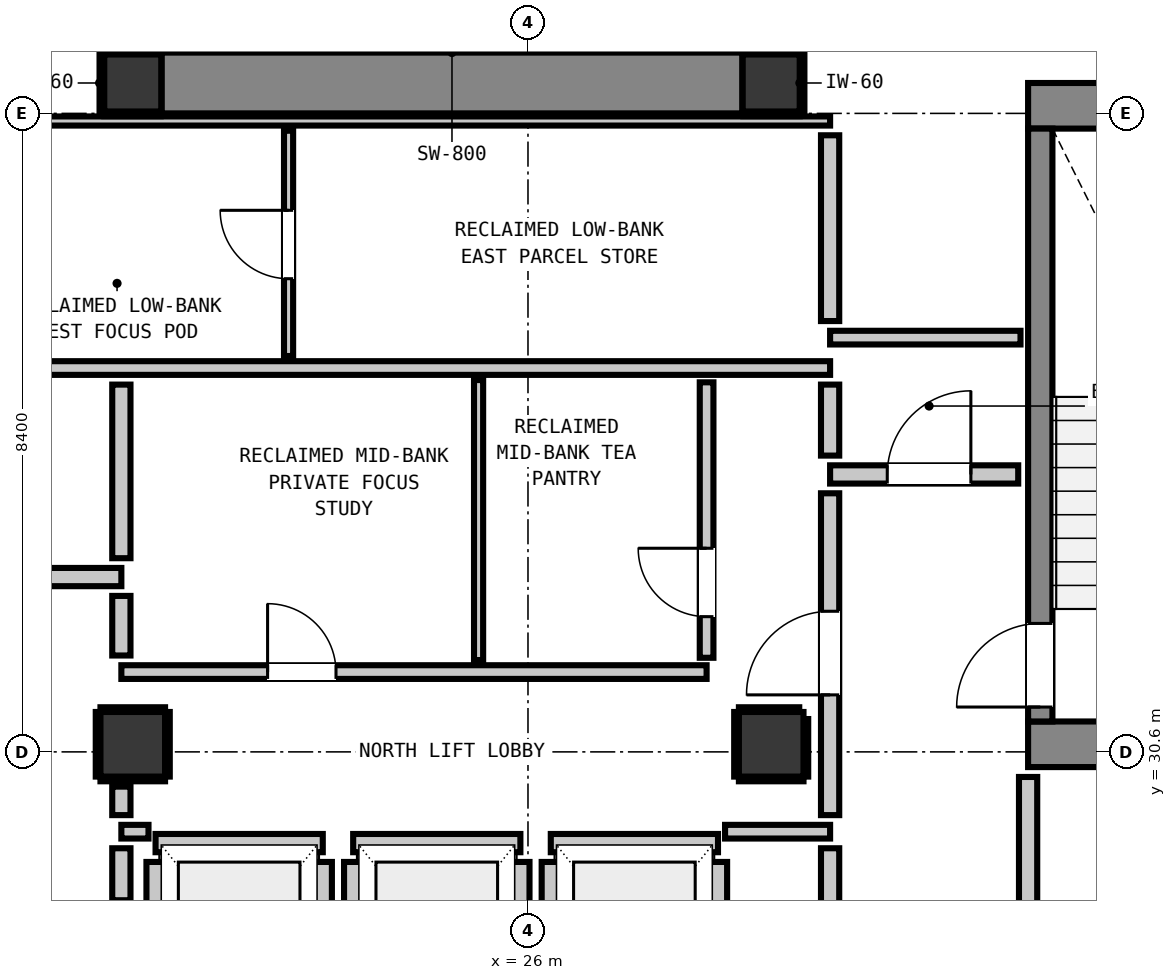
"""IFC4 building model, lengths in metres.
Left out: names, types, materials, properties, quantities, classifications, styles, units other than length and angle.
Written with IfcOpenShell. Run it as: python <this file> out.ifc"""

import sys

from ifc_helpers import new_model, si_unit, direction, frame, frame_2d, origin, origin_2d, place, context, subcontext, project, spatial, rectangle, extrude, element, fill, save


model = new_model("IFC4")
c1 = context("Model", 3, precision=1e-05, world=origin(), true_north=direction((0.0, 1.0)))
c2 = subcontext(c1, "Body", "Model", "MODEL_VIEW")
j1 = project(units=[si_unit("LENGTHUNIT", "METRE"), si_unit("PLANEANGLEUNIT", "RADIAN")], contexts=[c1])
p1 = place(None, origin())
s1 = spatial("IfcSite", under=j1, at=p1, CompositionType="ELEMENT")
p2 = place(p1, origin())
s2 = spatial("IfcBuilding", under=s1, at=p2, CompositionType="ELEMENT")
p3 = place(p2, frame((0.0, 0.0, 220.04)))
s3 = spatial("IfcBuildingStorey", under=s2, at=p3, CompositionType="ELEMENT", Elevation=220.04)
for number, where, z_axis, x_axis in (
    (1, (20.8, 39.4, 0.0), (0.0, 0.0, 1.0), (1.0, 0.0, 0.0)),
    (2, (29.2, 39.4, 0.0), (0.0, 0.0, 1.0), (1.0, 0.0, 0.0)),
):
    element("IfcColumn", number, at=place(p3, frame(where, z_axis=z_axis, x_axis=x_axis)), inside=s3, PredefinedType="COLUMN", context=c2, shape_type="SweptSolid", body=[
        extrude(rectangle(XDim=0.75, YDim=0.75, at=origin_2d()), origin(), (0.0, 0.0, 1.0), 3.32),
    ])
p4 = place(p3, frame((32.58, 39.1, 0.0), z_axis=(0.0, 0.0, 1.0), x_axis=(1.0, 0.0, 0.0)))
e3 = element("IfcWall", 3, at=p4, inside=s3, PredefinedType="SHEAR", context=c2, shape_type="SweptSolid", body=[
    extrude(rectangle(XDim=4.08, YDim=0.6, at=frame_2d((2.04, 0.0))), origin(), (0.0, 0.0, 1.0), 3.32),
])
p5 = place(p3, frame((32.58, 30.7, 0.0), z_axis=(0.0, 0.0, 1.0), x_axis=(1.0, 0.0, 0.0)))
e4 = element("IfcWall", 4, at=p5, inside=s3, PredefinedType="SHEAR", context=c2, shape_type="SweptSolid", body=[
    extrude(rectangle(XDim=3.54, YDim=0.6, at=frame_2d((1.77, 0.0))), origin(), (0.0, 0.0, 1.0), 3.32),
])
p6 = place(p3, frame((21.18, 39.4, 0.0), z_axis=(0.0, 0.0, 1.0), x_axis=(1.0, 0.0, 0.0)))
e5 = element("IfcWall", 5, at=p6, inside=s3, PredefinedType="SHEAR", context=c2, shape_type="SweptSolid", body=[
    extrude(rectangle(XDim=7.64, YDim=0.8, at=frame_2d((3.82, 0.0))), origin(), (0.0, 0.0, 1.0), 3.32),
])
p7 = place(p3, frame((32.74, 31.0, 0.0), z_axis=(0.0, 0.0, 1.0), x_axis=(0.0, 1.0, 0.0)))
e6 = element("IfcWall", 6, at=p7, inside=s3, PredefinedType="SHEAR", context=c2, shape_type="SweptSolid", body=[
    extrude(rectangle(XDim=7.8, YDim=0.32, at=frame_2d((3.9, 0.0))), origin(), (0.0, 0.0, 1.0), 3.32),
])
p8 = place(p7, frame((0.19, 0.0, 0.0)))
e7 = element("IfcOpeningElement", 7, at=p8, cuts=e6, PredefinedType="OPENING", context=c2, shape_type="SweptSolid", body=[
    extrude(rectangle(XDim=1.1, YDim=2.15, at=frame_2d((0.55, 1.075))), frame((0.0, 0.17, 0.0), z_axis=(0.0, -1.0, 0.0), x_axis=(1.0, 0.0, 0.0)), (0.0, 0.0, 1.0), 0.34),
])
for number, where, z_axis, x_axis in (
    (8, (20.8, 30.7, 0.0), (0.0, 0.0, 1.0), (1.0, 0.0, 0.0)),
    (9, (29.2, 30.7, 0.0), (0.0, 0.0, 1.0), (1.0, 0.0, 0.0)),
):
    element("IfcColumn", number, at=place(p3, frame(where, z_axis=z_axis, x_axis=x_axis)), inside=s3, PredefinedType="COLUMN", context=c2, shape_type="SweptSolid", body=[
        extrude(rectangle(XDim=0.85, YDim=0.85, at=origin_2d()), origin(), (0.0, 0.0, 1.0), 3.32),
    ])
p9 = place(p3, frame((21.1, 29.4, 0.0), z_axis=(0.0, 0.0, 1.0), x_axis=(1.0, 0.0, 0.0)))
e10 = element("IfcWall", 10, at=p9, inside=s3, PredefinedType="PARTITIONING", context=c2, shape_type="SweptSolid", body=[
    extrude(rectangle(XDim=2.2, YDim=0.24, at=frame_2d((1.1, 0.0))), origin(), (0.0, 0.0, 1.0), 3.1),
])
p10 = place(p3, frame((21.1, 27.048, 0.0), z_axis=(0.0, 0.0, 1.0), x_axis=(0.0, 1.0, 0.0)))
e11 = element("IfcWall", 11, at=p10, inside=s3, PredefinedType="PARTITIONING", context=c2, shape_type="SweptSolid", body=[
    extrude(rectangle(XDim=2.104, YDim=0.24, at=frame_2d((1.052, 0.0))), origin(), (0.0, 0.0, 1.0), 2.335),
])
p11 = place(p3, frame((23.3, 27.048, 0.0), z_axis=(0.0, 0.0, 1.0), x_axis=(0.0, 1.0, 0.0)))
e12 = element("IfcWall", 12, at=p11, inside=s3, PredefinedType="PARTITIONING", context=c2, shape_type="SweptSolid", body=[
    extrude(rectangle(XDim=2.104, YDim=0.24, at=frame_2d((1.052, 0.0))), origin(), (0.0, 0.0, 1.0), 3.1),
])
p12 = place(p3, frame((23.7, 29.4, 0.0), z_axis=(0.0, 0.0, 1.0), x_axis=(1.0, 0.0, 0.0)))
e13 = element("IfcWall", 13, at=p12, inside=s3, PredefinedType="PARTITIONING", context=c2, shape_type="SweptSolid", body=[
    extrude(rectangle(XDim=2.2, YDim=0.24, at=frame_2d((1.1, 0.0))), origin(), (0.0, 0.0, 1.0), 3.1),
])
for number, where, z_axis, x_axis in (
    (14, (23.7, 27.048, 0.0), (0.0, 0.0, 1.0), (0.0, 1.0, 0.0)),
    (15, (25.9, 27.048, 0.0), (0.0, 0.0, 1.0), (0.0, 1.0, 0.0)),
):
    element("IfcWall", number, at=place(p3, frame(where, z_axis=z_axis, x_axis=x_axis)), inside=s3, PredefinedType="PARTITIONING", context=c2, shape_type="SweptSolid", body=[
        extrude(rectangle(XDim=2.104, YDim=0.24, at=frame_2d((1.052, 0.0))), origin(), (0.0, 0.0, 1.0), 3.1),
    ])
p13 = place(p3, frame((26.3, 29.4, 0.0), z_axis=(0.0, 0.0, 1.0), x_axis=(1.0, 0.0, 0.0)))
e16 = element("IfcWall", 16, at=p13, inside=s3, PredefinedType="PARTITIONING", context=c2, shape_type="SweptSolid", body=[
    extrude(rectangle(XDim=2.2, YDim=0.24, at=frame_2d((1.1, 0.0))), origin(), (0.0, 0.0, 1.0), 3.1),
])
p14 = place(p3, frame((26.3, 27.048, 0.0), z_axis=(0.0, 0.0, 1.0), x_axis=(0.0, 1.0, 0.0)))
e17 = element("IfcWall", 17, at=p14, inside=s3, PredefinedType="PARTITIONING", context=c2, shape_type="SweptSolid", body=[
    extrude(rectangle(XDim=2.104, YDim=0.24, at=frame_2d((1.052, 0.0))), origin(), (0.0, 0.0, 1.0), 3.1),
])
p15 = place(p3, frame((28.5, 27.33, 0.0), z_axis=(0.0, 0.0, 1.0), x_axis=(0.0, 1.0, 0.0)))
e18 = element("IfcWall", 18, at=p15, inside=s3, PredefinedType="PARTITIONING", context=c2, shape_type="SweptSolid", body=[
    extrude(rectangle(XDim=1.822, YDim=0.24, at=frame_2d((0.911, 0.0))), origin(), (0.0, 0.0, 1.0), 3.1),
])
p16 = place(p3, frame((17.45, 32.9, 0.0), z_axis=(0.0, 0.0, 1.0), x_axis=(1.0, 0.0, 0.0)))
e19 = element("IfcWall", 19, at=p16, inside=s3, PredefinedType="PARTITIONING", context=c2, shape_type="SweptSolid", body=[
    extrude(rectangle(XDim=3.2, YDim=0.24, at=frame_2d((1.6, 0.0))), origin(), (0.0, 0.0, 1.0), 3.1),
])
p17 = place(p16, frame((0.159, 0.0, 0.0)))
e20 = element("IfcOpeningElement", 20, at=p17, cuts=e19, PredefinedType="OPENING", context=c2, shape_type="SweptSolid", body=[
    extrude(rectangle(XDim=1.1, YDim=2.15, at=frame_2d((0.55, 1.075))), frame((0.0, 0.13, 0.0), z_axis=(0.0, -1.0, 0.0), x_axis=(1.0, 0.0, 0.0)), (0.0, 0.0, 1.0), 0.26),
])
p18 = place(p3, frame((29.975, 34.25, 0.0), z_axis=(0.0, 0.0, 1.0), x_axis=(1.0, 0.0, 0.0)))
e21 = element("IfcWall", 21, at=p18, inside=s3, PredefinedType="PARTITIONING", context=c2, shape_type="SweptSolid", body=[
    extrude(rectangle(XDim=2.475, YDim=0.24, at=frame_2d((1.237, 0.0))), origin(), (0.0, 0.0, 1.0), 3.1),
])
p19 = place(p18, frame((0.752, 0.0, 0.0)))
e22 = element("IfcOpeningElement", 22, at=p19, cuts=e21, PredefinedType="OPENING", context=c2, shape_type="SweptSolid", body=[
    extrude(rectangle(XDim=1.1, YDim=2.15, at=frame_2d((0.55, 1.075))), frame((0.0, 0.13, 0.0), z_axis=(0.0, -1.0, 0.0), x_axis=(1.0, 0.0, 0.0)), (0.0, 0.0, 1.0), 0.26),
])
p20 = place(p3, frame((20.65, 29.55, 0.0), z_axis=(0.0, 0.0, 1.0), x_axis=(1.0, 0.0, 0.0)))
e23 = element("IfcWall", 23, at=p20, inside=s3, PredefinedType="PARTITIONING", context=c2, shape_type="SweptSolid", body=[
    extrude(rectangle(XDim=0.357, YDim=0.18, at=frame_2d((0.179, 0.0))), origin(), (0.0, 0.0, 1.0), 3.1),
])
p21 = place(p3, frame((28.593, 29.55, 0.0), z_axis=(0.0, 0.0, 1.0), x_axis=(1.0, 0.0, 0.0)))
e24 = element("IfcWall", 24, at=p21, inside=s3, PredefinedType="PARTITIONING", context=c2, shape_type="SweptSolid", body=[
    extrude(rectangle(XDim=1.382, YDim=0.18, at=frame_2d((0.691, 0.0))), origin(), (0.0, 0.0, 1.0), 3.1),
])
p22 = place(p3, frame((20.65, 31.65, 0.0), z_axis=(0.0, 0.0, 1.0), x_axis=(1.0, 0.0, 0.0)))
e25 = element("IfcWall", 25, at=p22, inside=s3, PredefinedType="PARTITIONING", context=c2, shape_type="SweptSolid", body=[
    extrude(rectangle(XDim=7.7, YDim=0.18, at=frame_2d((3.85, 0.0))), origin(), (0.0, 0.0, 1.0), 3.1),
])
p23 = place(p22, frame((1.924, 0.0, 0.0)))
e26 = element("IfcOpeningElement", 26, at=p23, cuts=e25, PredefinedType="OPENING", context=c2, shape_type="SweptSolid", body=[
    extrude(rectangle(XDim=0.9, YDim=2.1, at=frame_2d((0.45, 1.05))), frame((0.0, 0.1, 0.0), z_axis=(0.0, -1.0, 0.0), x_axis=(1.0, 0.0, 0.0)), (0.0, 0.0, 1.0), 0.2),
])
p24 = place(p3, frame((18.95, 35.65, 0.0), z_axis=(0.0, 0.0, 1.0), x_axis=(1.0, 0.0, 0.0)))
e27 = element("IfcWall", 27, at=p24, inside=s3, PredefinedType="PARTITIONING", context=c2, shape_type="SweptSolid", body=[
    extrude(rectangle(XDim=11.025, YDim=0.18, at=frame_2d((5.513, 0.0))), origin(), (0.0, 0.0, 1.0), 3.1),
])
p25 = place(p3, frame((29.975, 36.05, 0.0), z_axis=(0.0, 0.0, 1.0), x_axis=(1.0, 0.0, 0.0)))
e28 = element("IfcWall", 28, at=p25, inside=s3, PredefinedType="PARTITIONING", context=c2, shape_type="SweptSolid", body=[
    extrude(rectangle(XDim=2.505, YDim=0.18, at=frame_2d((1.252, 0.0))), origin(), (0.0, 0.0, 1.0), 3.1),
])
p26 = place(p3, frame((18.95, 38.9, 0.0), z_axis=(0.0, 0.0, 1.0), x_axis=(1.0, 0.0, 0.0)))
e29 = element("IfcWall", 29, at=p26, inside=s3, PredefinedType="PARTITIONING", context=c2, shape_type="SweptSolid", body=[
    extrude(rectangle(XDim=11.025, YDim=0.12, at=frame_2d((5.513, 0.0))), origin(), (0.0, 0.0, 1.0), 3.1),
])
p27 = place(p3, frame((20.65, 28.648, 0.0), z_axis=(0.0, 0.0, 1.0), x_axis=(0.0, 1.0, 0.0)))
e30 = element("IfcWall", 30, at=p27, inside=s3, PredefinedType="PARTITIONING", context=c2, shape_type="SweptSolid", body=[
    extrude(rectangle(XDim=0.684, YDim=0.24, at=frame_2d((0.342, 0.0))), origin(), (0.0, 0.0, 1.0), 2.335),
])
p28 = place(p3, frame((20.65, 29.768, 0.0), z_axis=(0.0, 0.0, 1.0), x_axis=(0.0, 1.0, 0.0)))
e31 = element("IfcWall", 31, at=p28, inside=s3, PredefinedType="PARTITIONING", context=c2, shape_type="SweptSolid", body=[
    extrude(rectangle(XDim=0.375, YDim=0.24, at=frame_2d((0.188, 0.0))), origin(), (0.0, 0.0, 1.0), 2.335),
])
p29 = place(p3, frame((20.65, 31.868, 0.0), z_axis=(0.0, 0.0, 1.0), x_axis=(0.0, 1.0, 0.0)))
e32 = element("IfcWall", 32, at=p29, inside=s3, PredefinedType="PARTITIONING", context=c2, shape_type="SweptSolid", body=[
    extrude(rectangle(XDim=0.784, YDim=0.24, at=frame_2d((0.392, 0.0))), origin(), (0.0, 0.0, 1.0), 2.335),
])
p30 = place(p3, frame((20.65, 33.148, 0.0), z_axis=(0.0, 0.0, 1.0), x_axis=(0.0, 1.0, 0.0)))
e33 = element("IfcWall", 33, at=p30, inside=s3, PredefinedType="PARTITIONING", context=c2, shape_type="SweptSolid", body=[
    extrude(rectangle(XDim=2.284, YDim=0.24, at=frame_2d((1.142, 0.0))), origin(), (0.0, 0.0, 1.0), 2.335),
])
p31 = place(p3, frame((29.975, 25.648, 0.0), z_axis=(0.0, 0.0, 1.0), x_axis=(0.0, 1.0, 0.0)))
e34 = element("IfcWall", 34, at=p31, inside=s3, PredefinedType="PARTITIONING", context=c2, shape_type="SweptSolid", body=[
    extrude(rectangle(XDim=3.684, YDim=0.24, at=frame_2d((1.842, 0.0))), origin(), (0.0, 0.0, 1.0), 3.1),
])
p32 = place(p3, frame((29.975, 29.768, 0.0), z_axis=(0.0, 0.0, 1.0), x_axis=(0.0, 1.0, 0.0)))
e35 = element("IfcWall", 35, at=p32, inside=s3, PredefinedType="PARTITIONING", context=c2, shape_type="SweptSolid", body=[
    extrude(rectangle(XDim=4.234, YDim=0.24, at=frame_2d((2.117, 0.0))), origin(), (0.0, 0.0, 1.0), 3.1),
])
p33 = place(p32, frame((1.582, 0.0, 0.0)))
e36 = element("IfcOpeningElement", 36, at=p33, cuts=e35, PredefinedType="OPENING", context=c2, shape_type="SweptSolid", body=[
    extrude(rectangle(XDim=1.1, YDim=2.15, at=frame_2d((0.55, 1.075))), frame((0.0, 0.13, 0.0), z_axis=(0.0, -1.0, 0.0), x_axis=(1.0, 0.0, 0.0)), (0.0, 0.0, 1.0), 0.26),
])
p34 = place(p3, frame((29.975, 34.498, 0.0), z_axis=(0.0, 0.0, 1.0), x_axis=(0.0, 1.0, 0.0)))
e37 = element("IfcWall", 37, at=p34, inside=s3, PredefinedType="PARTITIONING", context=c2, shape_type="SweptSolid", body=[
    extrude(rectangle(XDim=0.934, YDim=0.24, at=frame_2d((0.467, 0.0))), origin(), (0.0, 0.0, 1.0), 3.1),
])
p35 = place(p3, frame((29.975, 36.268, 0.0), z_axis=(0.0, 0.0, 1.0), x_axis=(0.0, 1.0, 0.0)))
e38 = element("IfcWall", 38, at=p35, inside=s3, PredefinedType="PARTITIONING", context=c2, shape_type="SweptSolid", body=[
    extrude(rectangle(XDim=2.444, YDim=0.24, at=frame_2d((1.222, 0.0))), origin(), (0.0, 0.0, 1.0), 3.1),
])
p36 = place(p3, frame((32.58, 25.648, 0.0), z_axis=(0.0, 0.0, 1.0), x_axis=(0.0, 1.0, 0.0)))
e39 = element("IfcWall", 39, at=p36, inside=s3, PredefinedType="PARTITIONING", context=c2, shape_type="SweptSolid", body=[
    extrude(rectangle(XDim=4.622, YDim=0.24, at=frame_2d((2.311, 0.0))), origin(), (0.0, 0.0, 1.0), 3.1),
])
p37 = place(p3, frame((28.35, 31.838, 0.0), z_axis=(0.0, 0.0, 1.0), x_axis=(0.0, 1.0, 0.0)))
e40 = element("IfcWall", 40, at=p37, inside=s3, PredefinedType="PARTITIONING", context=c2, shape_type="SweptSolid", body=[
    extrude(rectangle(XDim=3.624, YDim=0.18, at=frame_2d((1.812, 0.0))), origin(), (0.0, 0.0, 1.0), 3.1),
])
p38 = place(p37, frame((0.541, 0.0, 0.0)))
e41 = element("IfcOpeningElement", 41, at=p38, cuts=e40, PredefinedType="OPENING", context=c2, shape_type="SweptSolid", body=[
    extrude(rectangle(XDim=0.9, YDim=2.1, at=frame_2d((0.45, 1.05))), frame((0.0, 0.1, 0.0), z_axis=(0.0, -1.0, 0.0), x_axis=(1.0, 0.0, 0.0)), (0.0, 0.0, 1.0), 0.2),
])
p39 = place(p3, frame((22.85, 35.808, 0.0), z_axis=(0.0, 0.0, 1.0), x_axis=(0.0, 1.0, 0.0)))
e42 = element("IfcWall", 42, at=p39, inside=s3, PredefinedType="PARTITIONING", context=c2, shape_type="SweptSolid", body=[
    extrude(rectangle(XDim=2.964, YDim=0.12, at=frame_2d((1.482, 0.0))), origin(), (0.0, 0.0, 1.0), 3.1),
])
p40 = place(p39, frame((1.017, 0.0, 0.0)))
e43 = element("IfcOpeningElement", 43, at=p40, cuts=e42, PredefinedType="OPENING", context=c2, shape_type="SweptSolid", body=[
    extrude(rectangle(XDim=0.9, YDim=2.1, at=frame_2d((0.45, 1.05))), frame((0.0, 0.07, 0.0), z_axis=(0.0, -1.0, 0.0), x_axis=(1.0, 0.0, 0.0)), (0.0, 0.0, 1.0), 0.14),
])
p41 = place(p3, frame((25.35, 31.808, 0.0), z_axis=(0.0, 0.0, 1.0), x_axis=(0.0, 1.0, 0.0)))
e44 = element("IfcWall", 44, at=p41, inside=s3, PredefinedType="PARTITIONING", context=c2, shape_type="SweptSolid", body=[
    extrude(rectangle(XDim=3.684, YDim=0.12, at=frame_2d((1.842, 0.0))), origin(), (0.0, 0.0, 1.0), 3.1),
])
for number, where, z_axis, x_axis in (
    (45, (20.425, 38.993, 0.0), (0.0, 0.0, 1.0), (1.0, 0.0, 0.0)),
    (46, (20.425, 39.807, 0.0), (0.0, 0.0, 1.0), (1.0, 0.0, 0.0)),
):
    element("IfcWall", number, at=place(p3, frame(where, z_axis=z_axis, x_axis=x_axis)), inside=s3, PredefinedType="PARTITIONING", context=c2, shape_type="SweptSolid", body=[
        extrude(rectangle(XDim=0.742, YDim=0.06, at=frame_2d((0.371, 0.0))), origin(), (0.0, 0.0, 1.0), 1.45),
    ])
p42 = place(p3, frame((20.393, 39.025, 0.0), z_axis=(0.0, 0.0, 1.0), x_axis=(0.0, 1.0, 0.0)))
e47 = element("IfcWall", 47, at=p42, inside=s3, PredefinedType="PARTITIONING", context=c2, shape_type="SweptSolid", body=[
    extrude(rectangle(XDim=0.75, YDim=0.06, at=frame_2d((0.375, 0.0))), origin(), (0.0, 0.0, 1.0), 1.45),
])
for number, where, z_axis, x_axis in (
    (48, (28.833, 38.993, 0.0), (0.0, 0.0, 1.0), (1.0, 0.0, 0.0)),
    (49, (28.833, 39.807, 0.0), (0.0, 0.0, 1.0), (1.0, 0.0, 0.0)),
):
    element("IfcWall", number, at=place(p3, frame(where, z_axis=z_axis, x_axis=x_axis)), inside=s3, PredefinedType="PARTITIONING", context=c2, shape_type="SweptSolid", body=[
        extrude(rectangle(XDim=0.742, YDim=0.06, at=frame_2d((0.371, 0.0))), origin(), (0.0, 0.0, 1.0), 1.45),
    ])
p43 = place(p3, frame((29.607, 39.025, 0.0), z_axis=(0.0, 0.0, 1.0), x_axis=(0.0, 1.0, 0.0)))
e50 = element("IfcWall", 50, at=p43, inside=s3, PredefinedType="PARTITIONING", context=c2, shape_type="SweptSolid", body=[
    extrude(rectangle(XDim=0.75, YDim=0.06, at=frame_2d((0.375, 0.0))), origin(), (0.0, 0.0, 1.0), 1.45),
])
for number, where, z_axis, x_axis in (
    (51, (20.375, 30.243, 0.0), (0.0, 0.0, 1.0), (1.0, 0.0, 0.0)),
    (52, (20.375, 31.157, 0.0), (0.0, 0.0, 1.0), (1.0, 0.0, 0.0)),
    (53, (20.343, 30.275, 0.0), (0.0, 0.0, 1.0), (0.0, 1.0, 0.0)),
    (54, (21.257, 30.275, 0.0), (0.0, 0.0, 1.0), (0.0, 1.0, 0.0)),
    (55, (28.775, 30.243, 0.0), (0.0, 0.0, 1.0), (1.0, 0.0, 0.0)),
):
    element("IfcWall", number, at=place(p3, frame(where, z_axis=z_axis, x_axis=x_axis)), inside=s3, PredefinedType="PARTITIONING", context=c2, shape_type="SweptSolid", body=[
        extrude(rectangle(XDim=0.85, YDim=0.06, at=frame_2d((0.425, 0.0))), origin(), (0.0, 0.0, 1.0), 1.45),
    ])
p44 = place(p3, frame((28.775, 31.157, 0.0), z_axis=(0.0, 0.0, 1.0), x_axis=(1.0, 0.0, 0.0)))
e56 = element("IfcWall", 56, at=p44, inside=s3, PredefinedType="PARTITIONING", context=c2, shape_type="SweptSolid", body=[
    extrude(rectangle(XDim=0.794, YDim=0.06, at=frame_2d((0.397, 0.0))), origin(), (0.0, 0.0, 1.0), 1.45),
])
p45 = place(p3, frame((28.743, 30.275, 0.0), z_axis=(0.0, 0.0, 1.0), x_axis=(0.0, 1.0, 0.0)))
e57 = element("IfcWall", 57, at=p45, inside=s3, PredefinedType="PARTITIONING", context=c2, shape_type="SweptSolid", body=[
    extrude(rectangle(XDim=0.85, YDim=0.06, at=frame_2d((0.425, 0.0))), origin(), (0.0, 0.0, 1.0), 1.45),
])
p46 = place(p3, frame((29.657, 30.275, 0.0), z_axis=(0.0, 0.0, 1.0), x_axis=(0.0, 1.0, 0.0)))
e58 = element("IfcWall", 58, at=p46, inside=s3, PredefinedType="PARTITIONING", context=c2, shape_type="SweptSolid", body=[
    extrude(rectangle(XDim=0.757, YDim=0.06, at=frame_2d((0.378, 0.0))), origin(), (0.0, 0.0, 1.0), 1.45),
])
p47 = place(p8, origin())
e59 = element("IfcDoor", 59, at=p47, inside=s3, OperationType="SINGLE_SWING_LEFT", PredefinedType="DOOR", context=c2, shape_type="SweptSolid", body=[
    extrude(rectangle(XDim=1.1, YDim=2.15, at=frame_2d((0.55, 1.075))), frame((0.0, 0.025, 0.0), z_axis=(0.0, -1.0, 0.0), x_axis=(1.0, 0.0, 0.0)), (0.0, 0.0, 1.0), 0.05),
])
fill(e7, e59)
p48 = place(p33, origin())
e60 = element("IfcDoor", 60, at=p48, inside=s3, OperationType="SINGLE_SWING_LEFT", PredefinedType="DOOR", context=c2, shape_type="SweptSolid", body=[
    extrude(rectangle(XDim=1.1, YDim=2.15, at=frame_2d((0.55, 1.075))), frame((0.0, 0.025, 0.0), z_axis=(0.0, -1.0, 0.0), x_axis=(1.0, 0.0, 0.0)), (0.0, 0.0, 1.0), 0.05),
])
fill(e36, e60)
p49 = place(p19, origin())
e61 = element("IfcDoor", 61, at=p49, inside=s3, OperationType="SINGLE_SWING_RIGHT", PredefinedType="DOOR", context=c2, shape_type="SweptSolid", body=[
    extrude(rectangle(XDim=1.1, YDim=2.15, at=frame_2d((0.55, 1.075))), frame((0.0, 0.025, 0.0), z_axis=(0.0, -1.0, 0.0), x_axis=(1.0, 0.0, 0.0)), (0.0, 0.0, 1.0), 0.05),
])
fill(e22, e61)
p50 = place(p40, origin())
e62 = element("IfcDoor", 62, at=p50, inside=s3, OperationType="SINGLE_SWING_RIGHT", PredefinedType="DOOR", context=c2, shape_type="SweptSolid", body=[
    extrude(rectangle(XDim=0.9, YDim=2.1, at=frame_2d((0.45, 1.05))), frame((0.0, 0.025, 0.0), z_axis=(0.0, -1.0, 0.0), x_axis=(1.0, 0.0, 0.0)), (0.0, 0.0, 1.0), 0.05),
])
fill(e43, e62)
p51 = place(p23, origin())
e63 = element("IfcDoor", 63, at=p51, inside=s3, OperationType="SINGLE_SWING_LEFT", PredefinedType="DOOR", context=c2, shape_type="SweptSolid", body=[
    extrude(rectangle(XDim=0.9, YDim=2.1, at=frame_2d((0.45, 1.05))), frame((0.0, 0.025, 0.0), z_axis=(0.0, -1.0, 0.0), x_axis=(1.0, 0.0, 0.0)), (0.0, 0.0, 1.0), 0.05),
])
fill(e26, e63)
p52 = place(p38, origin())
e64 = element("IfcDoor", 64, at=p52, inside=s3, OperationType="SINGLE_SWING_RIGHT", PredefinedType="DOOR", context=c2, shape_type="SweptSolid", body=[
    extrude(rectangle(XDim=0.9, YDim=2.1, at=frame_2d((0.45, 1.05))), frame((0.0, 0.025, 0.0), z_axis=(0.0, -1.0, 0.0), x_axis=(1.0, 0.0, 0.0)), (0.0, 0.0, 1.0), 0.05),
])
fill(e41, e64)
save(model, sys.argv[1])
